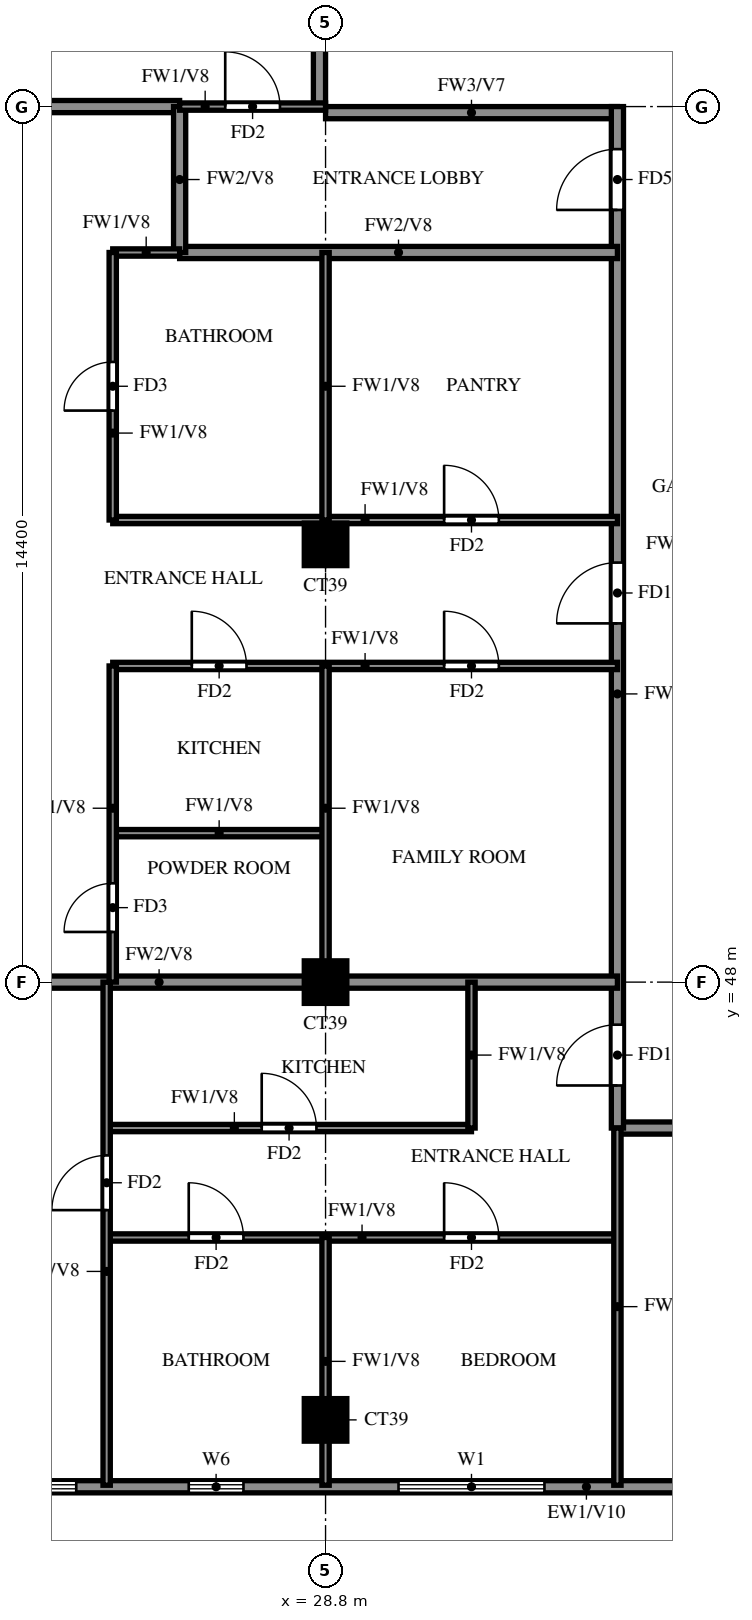
"""IFC4 building model, lengths in metres.
Left out: names, types, materials, properties, quantities, classifications, styles, units other than length and angle.
Written with IfcOpenShell. Run it as: python <this file> out.ifc"""

import sys

from ifc_helpers import new_model, si_unit, direction, frame, frame_2d, origin, origin_2d, place, context, subcontext, project, spatial, rectangle, extrude, source, transform, mapped, element, fill, save


model = new_model("IFC4")
c1 = context("Model", 3, precision=1e-05, world=origin(), true_north=direction((0.0, 1.0)))
c2 = subcontext(c1, "Body", "Model", "MODEL_VIEW")
j1 = project(units=[si_unit("LENGTHUNIT", "METRE"), si_unit("PLANEANGLEUNIT", "RADIAN")], contexts=[c1])
p1 = place(None, origin())
s1 = spatial("IfcSite", under=j1, at=p1, CompositionType="ELEMENT")
p2 = place(p1, origin())
s2 = spatial("IfcBuilding", under=s1, at=p2, CompositionType="ELEMENT")
p3 = place(p2, frame((0.0, 0.0, 267.5)))
s3 = spatial("IfcBuildingStorey", under=s2, at=p3, CompositionType="ELEMENT", Elevation=267.5)
m1 = source(origin(), c2, "Body", "SweptSolid", [
    extrude(rectangle(XDim=0.7, YDim=0.7, at=origin_2d()), origin(), (0.0, 0.0, 1.0), 3.099),
])
for number, where, z_axis, x_axis in (
    (1, (28.8, 40.8, 0.0), (0.0, 0.0, 1.0), (1.0, 0.0, 0.0)),
    (2, (28.8, 48.0, 0.0), (0.0, 0.0, 1.0), (1.0, 0.0, 0.0)),
    (3, (28.8, 55.2, 0.0), (0.0, 0.0, 1.0), (1.0, 0.0, 0.0)),
):
    element("IfcColumn", number, at=place(p3, frame(where, z_axis=z_axis, x_axis=x_axis)), inside=s3, PredefinedType="COLUMN", context=c2, shape_type="MappedRepresentation", body=[
        mapped(m1, transform((0.0, 0.0, 0.0))),
    ])
p4 = place(p3, frame((22.2, 39.7, 0.0), z_axis=(0.0, 0.0, 1.0), x_axis=(1.0, 0.0, 0.0)))
e4 = element("IfcWall", 4, at=p4, inside=s3, PredefinedType="SOLIDWALL", context=c2, shape_type="SweptSolid", body=[
    extrude(rectangle(XDim=19.8, YDim=0.2, at=frame_2d((9.9, 0.0))), origin(), (0.0, 0.0, 1.0), 3.099),
])
p5 = place(p4, frame((0.7, 0.0, 0.6)))
e5 = element("IfcOpeningElement", 5, at=p5, cuts=e4, PredefinedType="OPENING", context=c2, shape_type="SweptSolid", body=[
    extrude(rectangle(XDim=1.8, YDim=2.4, at=frame_2d((0.9, 1.2))), frame((0.0, 0.11, 0.0), z_axis=(0.0, -1.0, 0.0), x_axis=(1.0, 0.0, 0.0)), (0.0, 0.0, 1.0), 0.22),
])
p6 = place(p4, frame((4.35, 0.0, 1.5)))
e6 = element("IfcOpeningElement", 6, at=p6, cuts=e4, PredefinedType="OPENING", context=c2, shape_type="SweptSolid", body=[
    extrude(rectangle(XDim=0.9, YDim=0.9, at=frame_2d((0.45, 0.45))), frame((0.0, 0.11, 0.0), z_axis=(0.0, -1.0, 0.0), x_axis=(1.0, 0.0, 0.0)), (0.0, 0.0, 1.0), 0.22),
])
p7 = place(p4, frame((7.8, 0.0, 0.6)))
e7 = element("IfcOpeningElement", 7, at=p7, cuts=e4, PredefinedType="OPENING", context=c2, shape_type="SweptSolid", body=[
    extrude(rectangle(XDim=2.4, YDim=2.4, at=frame_2d((1.2, 1.2))), frame((0.0, 0.11, 0.0), z_axis=(0.0, -1.0, 0.0), x_axis=(1.0, 0.0, 0.0)), (0.0, 0.0, 1.0), 0.22),
])
p8 = place(p3, frame((33.6, 45.6, 0.0), z_axis=(0.0, 0.0, 1.0), x_axis=(1.0, 0.0, 0.0)))
e8 = element("IfcWall", 8, at=p8, inside=s3, PredefinedType="SOLIDWALL", context=c2, shape_type="SweptSolid", body=[
    extrude(rectangle(XDim=7.2, YDim=0.2, at=frame_2d((3.6, 0.0))), origin(), (0.0, 0.0, 1.0), 3.099),
])
p9 = place(p8, frame((3.15, 0.0, 0.0)))
e9 = element("IfcOpeningElement", 9, at=p9, cuts=e8, PredefinedType="OPENING", context=c2, shape_type="SweptSolid", body=[
    extrude(rectangle(XDim=0.9, YDim=2.1, at=frame_2d((0.45, 1.05))), frame((0.0, 0.11, 0.0), z_axis=(0.0, -1.0, 0.0), x_axis=(1.0, 0.0, 0.0)), (0.0, 0.0, 1.0), 0.22),
])
p10 = place(p3, frame((28.8, 62.3, 0.0), z_axis=(0.0, 0.0, 1.0), x_axis=(1.0, 0.0, 0.0)))
e10 = element("IfcWall", 10, at=p10, inside=s3, PredefinedType="SOLIDWALL", context=c2, shape_type="SweptSolid", body=[
    extrude(rectangle(XDim=4.8, YDim=0.2, at=frame_2d((2.4, 0.0))), origin(), (0.0, 0.0, 1.0), 3.099),
])
p11 = place(p3, frame((28.7, 62.4, 0.0), z_axis=(0.0, 0.0, 1.0), x_axis=(0.0, 1.0, 0.0)))
e11 = element("IfcWall", 11, at=p11, inside=s3, PredefinedType="SOLIDWALL", context=c2, shape_type="SweptSolid", body=[
    extrude(rectangle(XDim=15.6, YDim=0.2, at=frame_2d((7.8, 0.0))), origin(), (0.0, 0.0, 1.0), 3.099),
])
p12 = place(p3, frame((33.6, 45.6, 0.0), z_axis=(0.0, 0.0, 1.0), x_axis=(0.0, 1.0, 0.0)))
e12 = element("IfcWall", 12, at=p12, inside=s3, PredefinedType="SOLIDWALL", context=c2, shape_type="SweptSolid", body=[
    extrude(rectangle(XDim=16.8, YDim=0.2, at=frame_2d((8.4, 0.0))), origin(), (0.0, 0.0, 1.0), 3.099),
])
p13 = place(p12, frame((0.7, 0.0, 0.0)))
e13 = element("IfcOpeningElement", 13, at=p13, cuts=e12, PredefinedType="OPENING", context=c2, shape_type="SweptSolid", body=[
    extrude(rectangle(XDim=1.0, YDim=2.1, at=frame_2d((0.5, 1.05))), frame((0.0, 0.11, 0.0), z_axis=(0.0, -1.0, 0.0), x_axis=(1.0, 0.0, 0.0)), (0.0, 0.0, 1.0), 0.22),
])
p14 = place(p12, frame((8.3, 0.0, 0.0)))
e14 = element("IfcOpeningElement", 14, at=p14, cuts=e12, PredefinedType="OPENING", context=c2, shape_type="SweptSolid", body=[
    extrude(rectangle(XDim=1.0, YDim=2.1, at=frame_2d((0.5, 1.05))), frame((0.0, 0.11, 0.0), z_axis=(0.0, -1.0, 0.0), x_axis=(1.0, 0.0, 0.0)), (0.0, 0.0, 1.0), 0.22),
])
p15 = place(p12, frame((15.1, 0.0, 0.0)))
e15 = element("IfcOpeningElement", 15, at=p15, cuts=e12, PredefinedType="OPENING", context=c2, shape_type="SweptSolid", body=[
    extrude(rectangle(XDim=1.0, YDim=2.1, at=frame_2d((0.5, 1.05))), frame((0.0, 0.11, 0.0), z_axis=(0.0, -1.0, 0.0), x_axis=(1.0, 0.0, 0.0)), (0.0, 0.0, 1.0), 0.22),
])
p16 = place(p3, frame((18.525, 48.0, 0.0), z_axis=(0.0, 0.0, 1.0), x_axis=(1.0, 0.0, 0.0)))
e16 = element("IfcWall", 16, at=p16, inside=s3, PredefinedType="SOLIDWALL", context=c2, shape_type="SweptSolid", body=[
    extrude(rectangle(XDim=15.075, YDim=0.2, at=frame_2d((7.538, 0.0))), origin(), (0.0, 0.0, 1.0), 3.099),
])
p17 = place(p3, frame((26.4, 60.0, 0.0), z_axis=(0.0, 0.0, 1.0), x_axis=(1.0, 0.0, 0.0)))
e17 = element("IfcWall", 17, at=p17, inside=s3, PredefinedType="SOLIDWALL", context=c2, shape_type="SweptSolid", body=[
    extrude(rectangle(XDim=7.2, YDim=0.2, at=frame_2d((3.6, 0.0))), origin(), (0.0, 0.0, 1.0), 3.099),
])
p18 = place(p3, frame((18.525, 62.4, 0.0), z_axis=(0.0, 0.0, 1.0), x_axis=(1.0, 0.0, 0.0)))
e18 = element("IfcWall", 18, at=p18, inside=s3, PredefinedType="SOLIDWALL", context=c2, shape_type="SweptSolid", body=[
    extrude(rectangle(XDim=7.875, YDim=0.2, at=frame_2d((3.938, 0.0))), origin(), (0.0, 0.0, 1.0), 3.099),
])
p19 = place(p3, frame((26.4, 60.0, 0.0), z_axis=(0.0, 0.0, 1.0), x_axis=(0.0, 1.0, 0.0)))
e19 = element("IfcWall", 19, at=p19, inside=s3, PredefinedType="SOLIDWALL", context=c2, shape_type="SweptSolid", body=[
    extrude(rectangle(XDim=2.4, YDim=0.2, at=frame_2d((1.2, 0.0))), origin(), (0.0, 0.0, 1.0), 3.099),
])
p20 = place(p3, frame((25.2, 43.8, 0.0), z_axis=(0.0, 0.0, 1.0), x_axis=(1.0, 0.0, 0.0)))
e20 = element("IfcWall", 20, at=p20, inside=s3, PredefinedType="PARTITIONING", context=c2, shape_type="SweptSolid", body=[
    extrude(rectangle(XDim=8.4, YDim=0.12, at=frame_2d((4.2, 0.0))), origin(), (0.0, 0.0, 1.0), 3.099),
])
p21 = place(p20, frame((1.35, 0.0, 0.0)))
e21 = element("IfcOpeningElement", 21, at=p21, cuts=e20, PredefinedType="OPENING", context=c2, shape_type="SweptSolid", body=[
    extrude(rectangle(XDim=0.9, YDim=2.1, at=frame_2d((0.45, 1.05))), frame((0.0, 0.07, 0.0), z_axis=(0.0, -1.0, 0.0), x_axis=(1.0, 0.0, 0.0)), (0.0, 0.0, 1.0), 0.14),
])
p22 = place(p20, frame((5.55, 0.0, 0.0)))
e22 = element("IfcOpeningElement", 22, at=p22, cuts=e20, PredefinedType="OPENING", context=c2, shape_type="SweptSolid", body=[
    extrude(rectangle(XDim=0.9, YDim=2.1, at=frame_2d((0.45, 1.05))), frame((0.0, 0.07, 0.0), z_axis=(0.0, -1.0, 0.0), x_axis=(1.0, 0.0, 0.0)), (0.0, 0.0, 1.0), 0.14),
])
p23 = place(p3, frame((25.2, 45.6, 0.0), z_axis=(0.0, 0.0, 1.0), x_axis=(1.0, 0.0, 0.0)))
e23 = element("IfcWall", 23, at=p23, inside=s3, PredefinedType="PARTITIONING", context=c2, shape_type="SweptSolid", body=[
    extrude(rectangle(XDim=6.0, YDim=0.12, at=frame_2d((3.0, 0.0))), origin(), (0.0, 0.0, 1.0), 3.099),
])
p24 = place(p23, frame((2.55, 0.0, 0.0)))
e24 = element("IfcOpeningElement", 24, at=p24, cuts=e23, PredefinedType="OPENING", context=c2, shape_type="SweptSolid", body=[
    extrude(rectangle(XDim=0.9, YDim=2.1, at=frame_2d((0.45, 1.05))), frame((0.0, 0.07, 0.0), z_axis=(0.0, -1.0, 0.0), x_axis=(1.0, 0.0, 0.0)), (0.0, 0.0, 1.0), 0.14),
])
p25 = place(p3, frame((25.3, 50.45, 0.0), z_axis=(0.0, 0.0, 1.0), x_axis=(1.0, 0.0, 0.0)))
e25 = element("IfcWall", 25, at=p25, inside=s3, PredefinedType="PARTITIONING", context=c2, shape_type="SweptSolid", body=[
    extrude(rectangle(XDim=3.5, YDim=0.12, at=frame_2d((1.75, 0.0))), origin(), (0.0, 0.0, 1.0), 3.099),
])
p26 = place(p3, frame((25.3, 53.2, 0.0), z_axis=(0.0, 0.0, 1.0), x_axis=(1.0, 0.0, 0.0)))
e26 = element("IfcWall", 26, at=p26, inside=s3, PredefinedType="PARTITIONING", context=c2, shape_type="SweptSolid", body=[
    extrude(rectangle(XDim=8.3, YDim=0.12, at=frame_2d((4.15, 0.0))), origin(), (0.0, 0.0, 1.0), 3.099),
])
p27 = place(p26, frame((1.3, 0.0, 0.0)))
e27 = element("IfcOpeningElement", 27, at=p27, cuts=e26, PredefinedType="OPENING", context=c2, shape_type="SweptSolid", body=[
    extrude(rectangle(XDim=0.9, YDim=2.1, at=frame_2d((0.45, 1.05))), frame((0.0, 0.07, 0.0), z_axis=(0.0, -1.0, 0.0), x_axis=(1.0, 0.0, 0.0)), (0.0, 0.0, 1.0), 0.14),
])
p28 = place(p26, frame((5.45, 0.0, 0.0)))
e28 = element("IfcOpeningElement", 28, at=p28, cuts=e26, PredefinedType="OPENING", context=c2, shape_type="SweptSolid", body=[
    extrude(rectangle(XDim=0.9, YDim=2.1, at=frame_2d((0.45, 1.05))), frame((0.0, 0.07, 0.0), z_axis=(0.0, -1.0, 0.0), x_axis=(1.0, 0.0, 0.0)), (0.0, 0.0, 1.0), 0.14),
])
p29 = place(p3, frame((25.3, 55.6, 0.0), z_axis=(0.0, 0.0, 1.0), x_axis=(1.0, 0.0, 0.0)))
e29 = element("IfcWall", 29, at=p29, inside=s3, PredefinedType="PARTITIONING", context=c2, shape_type="SweptSolid", body=[
    extrude(rectangle(XDim=8.3, YDim=0.12, at=frame_2d((4.15, 0.0))), origin(), (0.0, 0.0, 1.0), 3.099),
])
p30 = place(p29, frame((5.45, 0.0, 0.0)))
e30 = element("IfcOpeningElement", 30, at=p30, cuts=e29, PredefinedType="OPENING", context=c2, shape_type="SweptSolid", body=[
    extrude(rectangle(XDim=0.9, YDim=2.1, at=frame_2d((0.45, 1.05))), frame((0.0, 0.07, 0.0), z_axis=(0.0, -1.0, 0.0), x_axis=(1.0, 0.0, 0.0)), (0.0, 0.0, 1.0), 0.14),
])
p31 = place(p3, frame((25.3, 60.0, 0.0), z_axis=(0.0, 0.0, 1.0), x_axis=(1.0, 0.0, 0.0)))
e31 = element("IfcWall", 31, at=p31, inside=s3, PredefinedType="PARTITIONING", context=c2, shape_type="SweptSolid", body=[
    extrude(rectangle(XDim=1.1, YDim=0.12, at=frame_2d((0.55, 0.0))), origin(), (0.0, 0.0, 1.0), 3.099),
])
p32 = place(p3, frame((26.4, 62.4, 0.0), z_axis=(0.0, 0.0, 1.0), x_axis=(1.0, 0.0, 0.0)))
e32 = element("IfcWall", 32, at=p32, inside=s3, PredefinedType="PARTITIONING", context=c2, shape_type="SweptSolid", body=[
    extrude(rectangle(XDim=2.4, YDim=0.12, at=frame_2d((1.2, 0.0))), origin(), (0.0, 0.0, 1.0), 3.099),
])
p33 = place(p32, frame((0.75, 0.0, 0.0)))
e33 = element("IfcOpeningElement", 33, at=p33, cuts=e32, PredefinedType="OPENING", context=c2, shape_type="SweptSolid", body=[
    extrude(rectangle(XDim=0.9, YDim=2.1, at=frame_2d((0.45, 1.05))), frame((0.0, 0.07, 0.0), z_axis=(0.0, -1.0, 0.0), x_axis=(1.0, 0.0, 0.0)), (0.0, 0.0, 1.0), 0.14),
])
p34 = place(p3, frame((25.2, 39.725, 0.0), z_axis=(0.0, 0.0, 1.0), x_axis=(0.0, 1.0, 0.0)))
e34 = element("IfcWall", 34, at=p34, inside=s3, PredefinedType="PARTITIONING", context=c2, shape_type="SweptSolid", body=[
    extrude(rectangle(XDim=8.275, YDim=0.12, at=frame_2d((4.137, 0.0))), origin(), (0.0, 0.0, 1.0), 3.099),
])
p35 = place(p34, frame((4.525, 0.0, 0.0)))
e35 = element("IfcOpeningElement", 35, at=p35, cuts=e34, PredefinedType="OPENING", context=c2, shape_type="SweptSolid", body=[
    extrude(rectangle(XDim=0.9, YDim=2.1, at=frame_2d((0.45, 1.05))), frame((0.0, 0.07, 0.0), z_axis=(0.0, -1.0, 0.0), x_axis=(1.0, 0.0, 0.0)), (0.0, 0.0, 1.0), 0.14),
])
p36 = place(p3, frame((25.3, 48.0, 0.0), z_axis=(0.0, 0.0, 1.0), x_axis=(0.0, 1.0, 0.0)))
e36 = element("IfcWall", 36, at=p36, inside=s3, PredefinedType="PARTITIONING", context=c2, shape_type="SweptSolid", body=[
    extrude(rectangle(XDim=5.2, YDim=0.12, at=frame_2d((2.6, 0.0))), origin(), (0.0, 0.0, 1.0), 3.099),
])
p37 = place(p36, frame((0.825, 0.0, 0.0)))
e37 = element("IfcOpeningElement", 37, at=p37, cuts=e36, PredefinedType="OPENING", context=c2, shape_type="SweptSolid", body=[
    extrude(rectangle(XDim=0.8, YDim=2.1, at=frame_2d((0.4, 1.05))), frame((0.0, 0.07, 0.0), z_axis=(0.0, -1.0, 0.0), x_axis=(1.0, 0.0, 0.0)), (0.0, 0.0, 1.0), 0.14),
])
p38 = place(p3, frame((25.3, 55.6, 0.0), z_axis=(0.0, 0.0, 1.0), x_axis=(0.0, 1.0, 0.0)))
e38 = element("IfcWall", 38, at=p38, inside=s3, PredefinedType="PARTITIONING", context=c2, shape_type="SweptSolid", body=[
    extrude(rectangle(XDim=4.4, YDim=0.12, at=frame_2d((2.2, 0.0))), origin(), (0.0, 0.0, 1.0), 3.099),
])
p39 = place(p38, frame((1.8, 0.0, 0.0)))
e39 = element("IfcOpeningElement", 39, at=p39, cuts=e38, PredefinedType="OPENING", context=c2, shape_type="SweptSolid", body=[
    extrude(rectangle(XDim=0.8, YDim=2.1, at=frame_2d((0.4, 1.05))), frame((0.0, 0.07, 0.0), z_axis=(0.0, -1.0, 0.0), x_axis=(1.0, 0.0, 0.0)), (0.0, 0.0, 1.0), 0.14),
])
p40 = place(p3, frame((28.8, 39.725, 0.0), z_axis=(0.0, 0.0, 1.0), x_axis=(0.0, 1.0, 0.0)))
e40 = element("IfcWall", 40, at=p40, inside=s3, PredefinedType="PARTITIONING", context=c2, shape_type="SweptSolid", body=[
    extrude(rectangle(XDim=4.075, YDim=0.12, at=frame_2d((2.038, 0.0))), origin(), (0.0, 0.0, 1.0), 3.099),
])
p41 = place(p3, frame((28.8, 48.0, 0.0), z_axis=(0.0, 0.0, 1.0), x_axis=(0.0, 1.0, 0.0)))
e41 = element("IfcWall", 41, at=p41, inside=s3, PredefinedType="PARTITIONING", context=c2, shape_type="SweptSolid", body=[
    extrude(rectangle(XDim=5.2, YDim=0.12, at=frame_2d((2.6, 0.0))), origin(), (0.0, 0.0, 1.0), 3.099),
])
p42 = place(p3, frame((28.8, 55.6, 0.0), z_axis=(0.0, 0.0, 1.0), x_axis=(0.0, 1.0, 0.0)))
e42 = element("IfcWall", 42, at=p42, inside=s3, PredefinedType="PARTITIONING", context=c2, shape_type="SweptSolid", body=[
    extrude(rectangle(XDim=4.4, YDim=0.12, at=frame_2d((2.2, 0.0))), origin(), (0.0, 0.0, 1.0), 3.099),
])
p43 = place(p3, frame((31.2, 45.6, 0.0), z_axis=(0.0, 0.0, 1.0), x_axis=(0.0, 1.0, 0.0)))
e43 = element("IfcWall", 43, at=p43, inside=s3, PredefinedType="PARTITIONING", context=c2, shape_type="SweptSolid", body=[
    extrude(rectangle(XDim=2.4, YDim=0.12, at=frame_2d((1.2, 0.0))), origin(), (0.0, 0.0, 1.0), 3.099),
])
p44 = place(p3, frame((33.6, 39.725, 0.0), z_axis=(0.0, 0.0, 1.0), x_axis=(0.0, 1.0, 0.0)))
e44 = element("IfcWall", 44, at=p44, inside=s3, PredefinedType="PARTITIONING", context=c2, shape_type="SweptSolid", body=[
    extrude(rectangle(XDim=5.875, YDim=0.12, at=frame_2d((2.938, 0.0))), origin(), (0.0, 0.0, 1.0), 3.099),
])
p45 = place(p5, origin())
e45 = element("IfcWindow", 45, at=p45, inside=s3, PartitioningType="DOUBLE_PANEL_VERTICAL", PredefinedType="WINDOW", context=c2, shape_type="SweptSolid", body=[
    extrude(rectangle(XDim=1.8, YDim=2.4, at=frame_2d((0.9, 1.2))), frame((0.0, 0.03, 0.0), z_axis=(0.0, -1.0, 0.0), x_axis=(1.0, 0.0, 0.0)), (0.0, 0.0, 1.0), 0.06),
])
fill(e5, e45)
p46 = place(p6, origin())
e46 = element("IfcWindow", 46, at=p46, inside=s3, PartitioningType="SINGLE_PANEL", PredefinedType="WINDOW", context=c2, shape_type="SweptSolid", body=[
    extrude(rectangle(XDim=0.9, YDim=0.9, at=frame_2d((0.45, 0.45))), frame((0.0, 0.03, 0.0), z_axis=(0.0, -1.0, 0.0), x_axis=(1.0, 0.0, 0.0)), (0.0, 0.0, 1.0), 0.06),
])
fill(e6, e46)
p47 = place(p7, origin())
e47 = element("IfcWindow", 47, at=p47, inside=s3, PartitioningType="DOUBLE_PANEL_VERTICAL", PredefinedType="WINDOW", context=c2, shape_type="SweptSolid", body=[
    extrude(rectangle(XDim=2.4, YDim=2.4, at=frame_2d((1.2, 1.2))), frame((0.0, 0.03, 0.0), z_axis=(0.0, -1.0, 0.0), x_axis=(1.0, 0.0, 0.0)), (0.0, 0.0, 1.0), 0.06),
])
fill(e7, e47)
p48 = place(p13, origin())
e48 = element("IfcDoor", 48, at=p48, inside=s3, OperationType="SINGLE_SWING_RIGHT", PredefinedType="DOOR", context=c2, shape_type="SweptSolid", body=[
    extrude(rectangle(XDim=1.0, YDim=2.1, at=frame_2d((0.5, 1.05))), frame((0.0, 0.025, 0.0), z_axis=(0.0, -1.0, 0.0), x_axis=(1.0, 0.0, 0.0)), (0.0, 0.0, 1.0), 0.05),
])
fill(e13, e48)
p49 = place(p35, origin())
e49 = element("IfcDoor", 49, at=p49, inside=s3, OperationType="SINGLE_SWING_LEFT", PredefinedType="DOOR", context=c2, shape_type="SweptSolid", body=[
    extrude(rectangle(XDim=0.9, YDim=2.1, at=frame_2d((0.45, 1.05))), frame((0.0, 0.025, 0.0), z_axis=(0.0, -1.0, 0.0), x_axis=(1.0, 0.0, 0.0)), (0.0, 0.0, 1.0), 0.05),
])
fill(e35, e49)
p50 = place(p21, origin())
e50 = element("IfcDoor", 50, at=p50, inside=s3, OperationType="SINGLE_SWING_LEFT", PredefinedType="DOOR", context=c2, shape_type="SweptSolid", body=[
    extrude(rectangle(XDim=0.9, YDim=2.1, at=frame_2d((0.45, 1.05))), frame((0.0, 0.025, 0.0), z_axis=(0.0, -1.0, 0.0), x_axis=(1.0, 0.0, 0.0)), (0.0, 0.0, 1.0), 0.05),
])
fill(e21, e50)
p51 = place(p22, origin())
e51 = element("IfcDoor", 51, at=p51, inside=s3, OperationType="SINGLE_SWING_RIGHT", PredefinedType="DOOR", context=c2, shape_type="SweptSolid", body=[
    extrude(rectangle(XDim=0.9, YDim=2.1, at=frame_2d((0.45, 1.05))), frame((0.0, 0.025, 0.0), z_axis=(0.0, -1.0, 0.0), x_axis=(1.0, 0.0, 0.0)), (0.0, 0.0, 1.0), 0.05),
])
fill(e22, e51)
p52 = place(p24, origin())
e52 = element("IfcDoor", 52, at=p52, inside=s3, OperationType="SINGLE_SWING_LEFT", PredefinedType="DOOR", context=c2, shape_type="SweptSolid", body=[
    extrude(rectangle(XDim=0.9, YDim=2.1, at=frame_2d((0.45, 1.05))), frame((0.0, 0.025, 0.0), z_axis=(0.0, -1.0, 0.0), x_axis=(1.0, 0.0, 0.0)), (0.0, 0.0, 1.0), 0.05),
])
fill(e24, e52)
p53 = place(p14, origin())
e53 = element("IfcDoor", 53, at=p53, inside=s3, OperationType="SINGLE_SWING_RIGHT", PredefinedType="DOOR", context=c2, shape_type="SweptSolid", body=[
    extrude(rectangle(XDim=1.0, YDim=2.1, at=frame_2d((0.5, 1.05))), frame((0.0, 0.025, 0.0), z_axis=(0.0, -1.0, 0.0), x_axis=(1.0, 0.0, 0.0)), (0.0, 0.0, 1.0), 0.05),
])
fill(e14, e53)
p54 = place(p37, origin())
e54 = element("IfcDoor", 54, at=p54, inside=s3, OperationType="SINGLE_SWING_LEFT", PredefinedType="DOOR", context=c2, shape_type="SweptSolid", body=[
    extrude(rectangle(XDim=0.8, YDim=2.1, at=frame_2d((0.4, 1.05))), frame((0.0, 0.025, 0.0), z_axis=(0.0, -1.0, 0.0), x_axis=(1.0, 0.0, 0.0)), (0.0, 0.0, 1.0), 0.05),
])
fill(e37, e54)
p55 = place(p27, origin())
e55 = element("IfcDoor", 55, at=p55, inside=s3, OperationType="SINGLE_SWING_LEFT", PredefinedType="DOOR", context=c2, shape_type="SweptSolid", body=[
    extrude(rectangle(XDim=0.9, YDim=2.1, at=frame_2d((0.45, 1.05))), frame((0.0, 0.025, 0.0), z_axis=(0.0, -1.0, 0.0), x_axis=(1.0, 0.0, 0.0)), (0.0, 0.0, 1.0), 0.05),
])
fill(e27, e55)
p56 = place(p39, origin())
e56 = element("IfcDoor", 56, at=p56, inside=s3, OperationType="SINGLE_SWING_RIGHT", PredefinedType="DOOR", context=c2, shape_type="SweptSolid", body=[
    extrude(rectangle(XDim=0.8, YDim=2.1, at=frame_2d((0.4, 1.05))), frame((0.0, 0.025, 0.0), z_axis=(0.0, -1.0, 0.0), x_axis=(1.0, 0.0, 0.0)), (0.0, 0.0, 1.0), 0.05),
])
fill(e39, e56)
p57 = place(p28, origin())
e57 = element("IfcDoor", 57, at=p57, inside=s3, OperationType="SINGLE_SWING_LEFT", PredefinedType="DOOR", context=c2, shape_type="SweptSolid", body=[
    extrude(rectangle(XDim=0.9, YDim=2.1, at=frame_2d((0.45, 1.05))), frame((0.0, 0.025, 0.0), z_axis=(0.0, -1.0, 0.0), x_axis=(1.0, 0.0, 0.0)), (0.0, 0.0, 1.0), 0.05),
])
fill(e28, e57)
p58 = place(p30, origin())
e58 = element("IfcDoor", 58, at=p58, inside=s3, OperationType="SINGLE_SWING_LEFT", PredefinedType="DOOR", context=c2, shape_type="SweptSolid", body=[
    extrude(rectangle(XDim=0.9, YDim=2.1, at=frame_2d((0.45, 1.05))), frame((0.0, 0.025, 0.0), z_axis=(0.0, -1.0, 0.0), x_axis=(1.0, 0.0, 0.0)), (0.0, 0.0, 1.0), 0.05),
])
fill(e30, e58)
p59 = place(p33, origin())
e59 = element("IfcDoor", 59, at=p59, inside=s3, OperationType="SINGLE_SWING_RIGHT", PredefinedType="DOOR", context=c2, shape_type="SweptSolid", body=[
    extrude(rectangle(XDim=0.9, YDim=2.1, at=frame_2d((0.45, 1.05))), frame((0.0, 0.025, 0.0), z_axis=(0.0, -1.0, 0.0), x_axis=(1.0, 0.0, 0.0)), (0.0, 0.0, 1.0), 0.05),
])
fill(e33, e59)
p60 = place(p15, origin())
e60 = element("IfcDoor", 60, at=p60, inside=s3, OperationType="SINGLE_SWING_LEFT", PredefinedType="DOOR", context=c2, shape_type="SweptSolid", body=[
    extrude(rectangle(XDim=1.0, YDim=2.1, at=frame_2d((0.5, 1.05))), frame((0.0, 0.025, 0.0), z_axis=(0.0, -1.0, 0.0), x_axis=(1.0, 0.0, 0.0)), (0.0, 0.0, 1.0), 0.05),
])
fill(e15, e60)
save(model, sys.argv[1])
